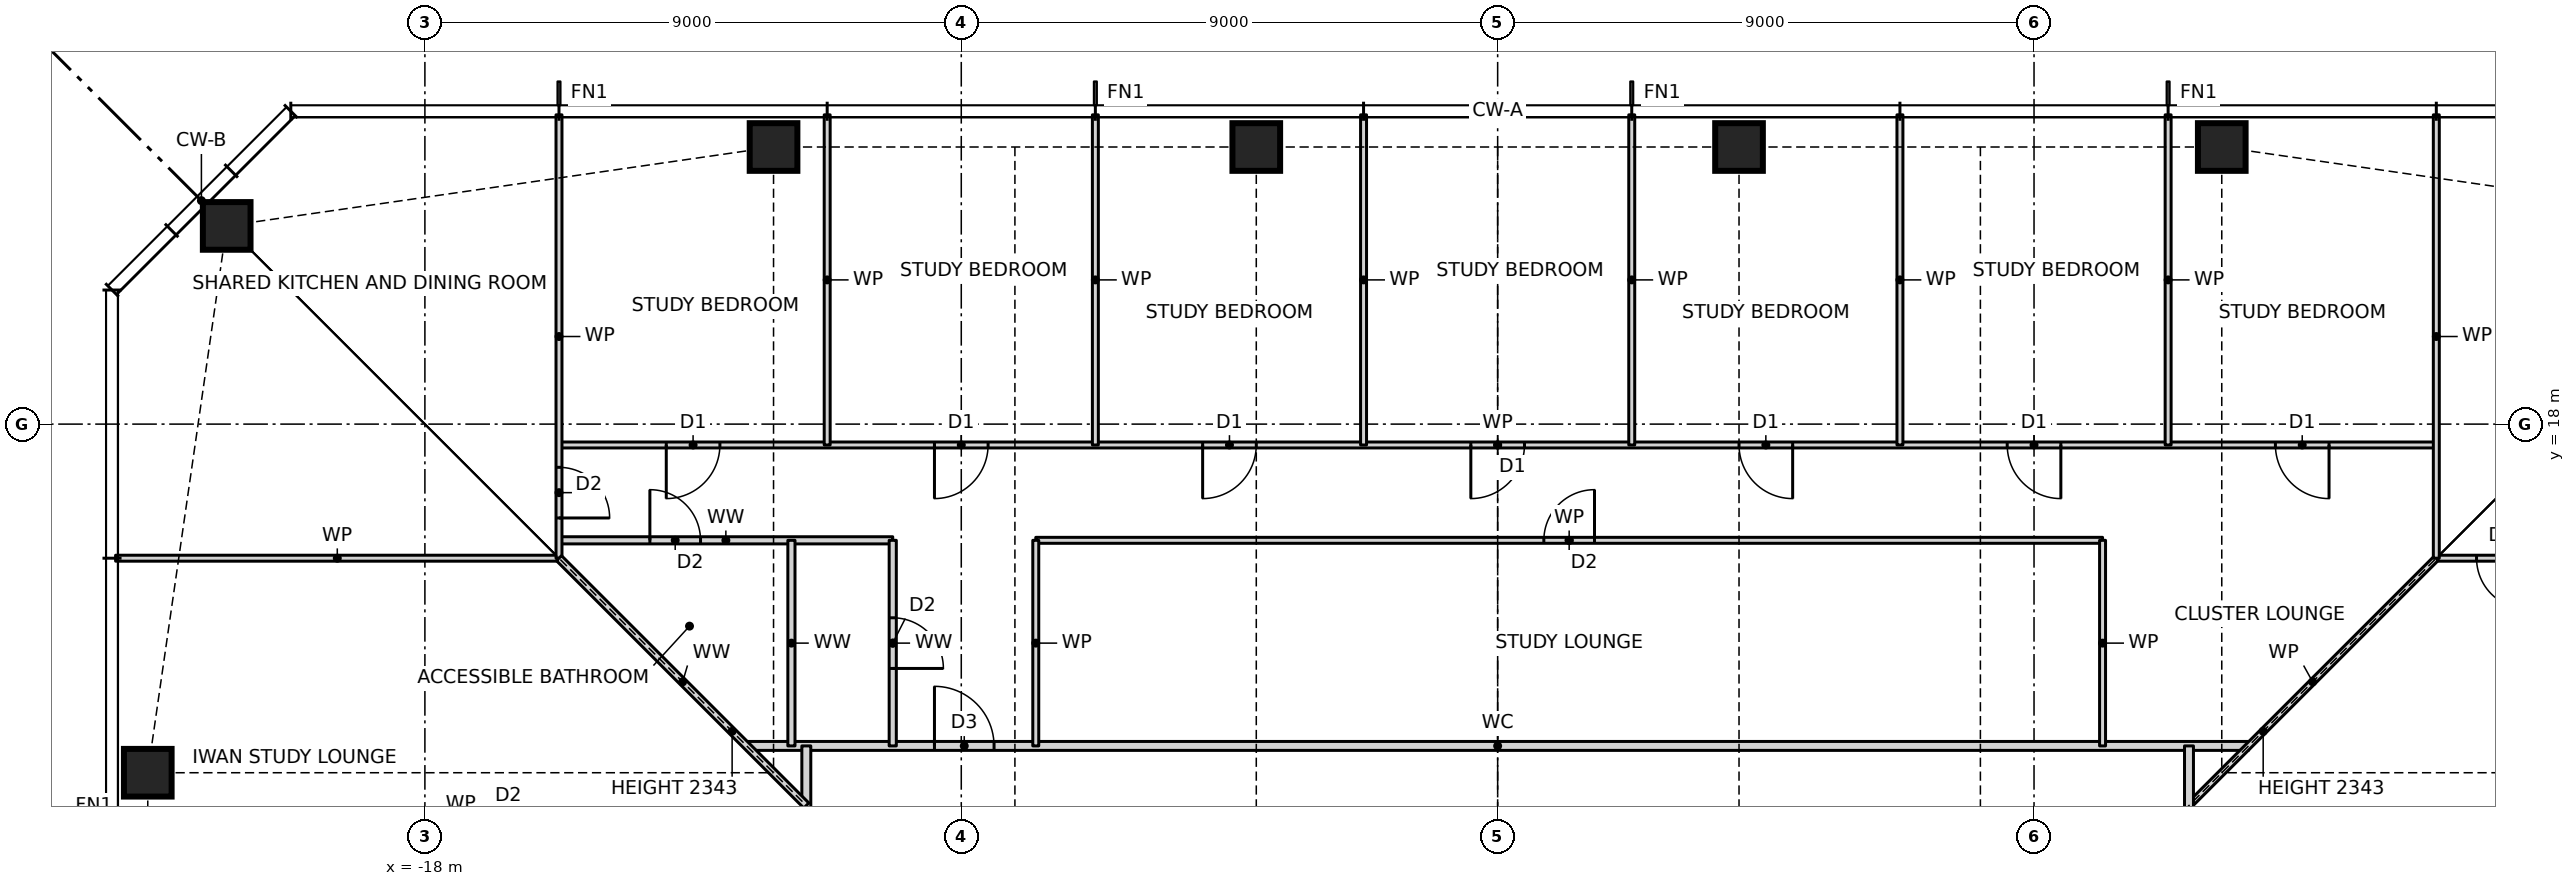
"""IFC4 building model, lengths in metres.
Left out: names, types, materials, properties, quantities, classifications, styles, units other than length and angle.
Written with IfcOpenShell. Run it as: python <this file> out.ifc"""

import sys

from ifc_helpers import new_model, si_unit, direction, frame, frame_2d, origin, origin_2d, place, context, subcontext, project, spatial, rectangle, hollow_rectangle, extrude, element, fill, save


model = new_model("IFC4")
c1 = context("Model", 3, precision=1e-05, world=origin(), true_north=direction((0.0, 1.0)))
c2 = subcontext(c1, "Body", "Model", "MODEL_VIEW")
j1 = project(units=[si_unit("LENGTHUNIT", "METRE"), si_unit("PLANEANGLEUNIT", "RADIAN")], contexts=[c1])
p1 = place(None, origin())
s1 = spatial("IfcSite", under=j1, at=p1, CompositionType="ELEMENT")
p2 = place(p1, origin())
s2 = spatial("IfcBuilding", under=s1, at=p2, CompositionType="ELEMENT")
p3 = place(p2, frame((0.0, 0.0, 36.0)))
s3 = spatial("IfcBuildingStorey", under=s2, at=p3, CompositionType="ELEMENT", Elevation=36.0)
for number, where, z_axis, x_axis in (
    (1, (12.15, 22.65, 0.0), (0.0, 0.0, 1.0), (1.0, 0.0, 0.0)),
    (2, (4.05, 22.65, 0.0), (0.0, 0.0, 1.0), (1.0, 0.0, 0.0)),
    (3, (-4.05, 22.65, 0.0), (0.0, 0.0, 1.0), (1.0, 0.0, 0.0)),
    (4, (-12.15, 22.65, 0.0), (0.0, 0.0, 1.0), (1.0, 0.0, 0.0)),
    (5, (-21.326, 21.326, 0.0), (0.0, 0.0, 1.0), (1.0, 0.0, 0.0)),
    (6, (-22.65, 12.15, 0.0), (0.0, 0.0, 1.0), (1.0, 0.0, 0.0)),
):
    element("IfcColumn", number, at=place(p3, frame(where, z_axis=z_axis, x_axis=x_axis)), inside=s3, PredefinedType="COLUMN", context=c2, shape_type="SweptSolid", body=[
        extrude(hollow_rectangle(XDim=0.8, YDim=0.8, WallThickness=0.09, at=origin_2d()), origin(), (0.0, 0.0, 1.0), 3.5),
    ])
p4 = place(p3, frame((-12.6, 12.6, 0.0), z_axis=(0.0, 0.0, 1.0), x_axis=(1.0, 0.0, 0.0)))
e7 = element("IfcWall", 7, at=p4, inside=s3, PredefinedType="PARTITIONING", context=c2, shape_type="SweptSolid", body=[
    extrude(rectangle(XDim=25.2, YDim=0.15, at=frame_2d((12.6, 0.0))), origin(), (0.0, 0.0, 1.0), 3.27),
])
p5 = place(p4, frame((3.15, 0.0, 0.0)))
e8 = element("IfcOpeningElement", 8, at=p5, cuts=e7, PredefinedType="OPENING", context=c2, shape_type="SweptSolid", body=[
    extrude(rectangle(XDim=1.0, YDim=2.1, at=frame_2d((0.5, 1.05))), frame((0.0, 0.085, 0.0), z_axis=(0.0, -1.0, 0.0), x_axis=(1.0, 0.0, 0.0)), (0.0, 0.0, 1.0), 0.17),
])
p6 = place(p3, frame((-23.19, 15.75, 0.0), z_axis=(0.0, 0.0, 1.0), x_axis=(1.0, 0.0, 0.0)))
e9 = element("IfcWall", 9, at=p6, inside=s3, PredefinedType="PARTITIONING", context=c2, shape_type="SweptSolid", body=[
    extrude(rectangle(XDim=7.44, YDim=0.1, at=frame_2d((3.72, 0.0))), origin(), (0.0, 0.0, 1.0), 3.27),
])
p7 = place(p3, frame((15.75, 15.75, 0.0), z_axis=(0.0, 0.0, 1.0), x_axis=(1.0, 0.0, 0.0)))
e10 = element("IfcWall", 10, at=p7, inside=s3, PredefinedType="PARTITIONING", context=c2, shape_type="SweptSolid", body=[
    extrude(rectangle(XDim=7.44, YDim=0.1, at=frame_2d((3.72, 0.0))), origin(), (0.0, 0.0, 1.0), 3.27),
])
p8 = place(p7, frame((0.675, 0.0, 0.0)))
e11 = element("IfcOpeningElement", 11, at=p8, cuts=e10, PredefinedType="OPENING", context=c2, shape_type="SweptSolid", body=[
    extrude(rectangle(XDim=0.85, YDim=2.1, at=frame_2d((0.425, 1.05))), frame((0.0, 0.06, 0.0), z_axis=(0.0, -1.0, 0.0), x_axis=(1.0, 0.0, 0.0)), (0.0, 0.0, 1.0), 0.12),
])
p9 = place(p3, frame((-15.75, 16.05, 0.0), z_axis=(0.0, 0.0, 1.0), x_axis=(1.0, 0.0, 0.0)))
e12 = element("IfcWall", 12, at=p9, inside=s3, PredefinedType="PARTITIONING", context=c2, shape_type="SweptSolid", body=[
    extrude(rectangle(XDim=5.6, YDim=0.12, at=frame_2d((2.8, 0.0))), origin(), (0.0, 0.0, 1.0), 3.27),
])
p10 = place(p9, frame((1.525, 0.0, 0.0)))
e13 = element("IfcOpeningElement", 13, at=p10, cuts=e12, PredefinedType="OPENING", context=c2, shape_type="SweptSolid", body=[
    extrude(rectangle(XDim=0.85, YDim=2.1, at=frame_2d((0.425, 1.05))), frame((0.0, 0.07, 0.0), z_axis=(0.0, -1.0, 0.0), x_axis=(1.0, 0.0, 0.0)), (0.0, 0.0, 1.0), 0.14),
])
p11 = place(p3, frame((-7.75, 16.05, 0.0), z_axis=(0.0, 0.0, 1.0), x_axis=(1.0, 0.0, 0.0)))
e14 = element("IfcWall", 14, at=p11, inside=s3, PredefinedType="PARTITIONING", context=c2, shape_type="SweptSolid", body=[
    extrude(rectangle(XDim=17.9, YDim=0.1, at=frame_2d((8.95, 0.0))), origin(), (0.0, 0.0, 1.0), 3.27),
])
p12 = place(p11, frame((8.525, 0.0, 0.0)))
e15 = element("IfcOpeningElement", 15, at=p12, cuts=e14, PredefinedType="OPENING", context=c2, shape_type="SweptSolid", body=[
    extrude(rectangle(XDim=0.85, YDim=2.1, at=frame_2d((0.425, 1.05))), frame((0.0, 0.06, 0.0), z_axis=(0.0, -1.0, 0.0), x_axis=(1.0, 0.0, 0.0)), (0.0, 0.0, 1.0), 0.12),
])
p13 = place(p3, frame((-15.75, 17.65, 0.0), z_axis=(0.0, 0.0, 1.0), x_axis=(1.0, 0.0, 0.0)))
e16 = element("IfcWall", 16, at=p13, inside=s3, PredefinedType="PARTITIONING", context=c2, shape_type="SweptSolid", body=[
    extrude(rectangle(XDim=31.5, YDim=0.1, at=frame_2d((15.75, 0.0))), origin(), (0.0, 0.0, 1.0), 3.27),
])
p14 = place(p13, frame((28.8, 0.0, 0.0)))
e17 = element("IfcOpeningElement", 17, at=p14, cuts=e16, PredefinedType="OPENING", context=c2, shape_type="SweptSolid", body=[
    extrude(rectangle(XDim=0.9, YDim=2.1, at=frame_2d((0.45, 1.05))), frame((0.0, 0.06, 0.0), z_axis=(0.0, -1.0, 0.0), x_axis=(1.0, 0.0, 0.0)), (0.0, 0.0, 1.0), 0.12),
])
p15 = place(p13, frame((24.3, 0.0, 0.0)))
e18 = element("IfcOpeningElement", 18, at=p15, cuts=e16, PredefinedType="OPENING", context=c2, shape_type="SweptSolid", body=[
    extrude(rectangle(XDim=0.9, YDim=2.1, at=frame_2d((0.45, 1.05))), frame((0.0, 0.06, 0.0), z_axis=(0.0, -1.0, 0.0), x_axis=(1.0, 0.0, 0.0)), (0.0, 0.0, 1.0), 0.12),
])
p16 = place(p13, frame((19.8, 0.0, 0.0)))
e19 = element("IfcOpeningElement", 19, at=p16, cuts=e16, PredefinedType="OPENING", context=c2, shape_type="SweptSolid", body=[
    extrude(rectangle(XDim=0.9, YDim=2.1, at=frame_2d((0.45, 1.05))), frame((0.0, 0.06, 0.0), z_axis=(0.0, -1.0, 0.0), x_axis=(1.0, 0.0, 0.0)), (0.0, 0.0, 1.0), 0.12),
])
p17 = place(p13, frame((15.3, 0.0, 0.0)))
e20 = element("IfcOpeningElement", 20, at=p17, cuts=e16, PredefinedType="OPENING", context=c2, shape_type="SweptSolid", body=[
    extrude(rectangle(XDim=0.9, YDim=2.1, at=frame_2d((0.45, 1.05))), frame((0.0, 0.06, 0.0), z_axis=(0.0, -1.0, 0.0), x_axis=(1.0, 0.0, 0.0)), (0.0, 0.0, 1.0), 0.12),
])
p18 = place(p13, frame((10.8, 0.0, 0.0)))
e21 = element("IfcOpeningElement", 21, at=p18, cuts=e16, PredefinedType="OPENING", context=c2, shape_type="SweptSolid", body=[
    extrude(rectangle(XDim=0.9, YDim=2.1, at=frame_2d((0.45, 1.05))), frame((0.0, 0.06, 0.0), z_axis=(0.0, -1.0, 0.0), x_axis=(1.0, 0.0, 0.0)), (0.0, 0.0, 1.0), 0.12),
])
p19 = place(p13, frame((6.3, 0.0, 0.0)))
e22 = element("IfcOpeningElement", 22, at=p19, cuts=e16, PredefinedType="OPENING", context=c2, shape_type="SweptSolid", body=[
    extrude(rectangle(XDim=0.9, YDim=2.1, at=frame_2d((0.45, 1.05))), frame((0.0, 0.06, 0.0), z_axis=(0.0, -1.0, 0.0), x_axis=(1.0, 0.0, 0.0)), (0.0, 0.0, 1.0), 0.12),
])
p20 = place(p13, frame((1.8, 0.0, 0.0)))
e23 = element("IfcOpeningElement", 23, at=p20, cuts=e16, PredefinedType="OPENING", context=c2, shape_type="SweptSolid", body=[
    extrude(rectangle(XDim=0.9, YDim=2.1, at=frame_2d((0.45, 1.05))), frame((0.0, 0.06, 0.0), z_axis=(0.0, -1.0, 0.0), x_axis=(1.0, 0.0, 0.0)), (0.0, 0.0, 1.0), 0.12),
])
p21 = place(p3, frame((11.6, 11.6, 0.0), z_axis=(0.0, 0.0, 1.0), x_axis=(0.707106781187, 0.707106781187, 0.0)))
e24 = element("IfcWall", 24, at=p21, inside=s3, PredefinedType="PARTITIONING", context=c2, shape_type="SweptSolid", body=[
    extrude(rectangle(XDim=5.869, YDim=0.1, at=frame_2d((2.935, 0.0))), origin(), (0.0, 0.0, 1.0), 2.343),
])
p22 = place(p3, frame((15.75, 15.75, 0.0), z_axis=(0.0, 0.0, 1.0), x_axis=(0.0, 1.0, 0.0)))
e25 = element("IfcWall", 25, at=p22, inside=s3, PredefinedType="PARTITIONING", context=c2, shape_type="SweptSolid", body=[
    extrude(rectangle(XDim=7.44, YDim=0.1, at=frame_2d((3.72, 0.0))), origin(), (0.0, 0.0, 1.0), 3.27),
])
p23 = place(p3, frame((11.6, -11.6, 0.0), z_axis=(0.0, 0.0, 1.0), x_axis=(0.0, 1.0, 0.0)))
e26 = element("IfcWall", 26, at=p23, inside=s3, PredefinedType="PARTITIONING", context=c2, shape_type="SweptSolid", body=[
    extrude(rectangle(XDim=24.2, YDim=0.15, at=frame_2d((12.1, 0.0))), origin(), (0.0, 0.0, 1.0), 3.27),
])
p24 = place(p23, frame((3.6, 0.0, 0.0)))
e27 = element("IfcOpeningElement", 27, at=p24, cuts=e26, PredefinedType="OPENING", context=c2, shape_type="SweptSolid", body=[
    extrude(rectangle(XDim=1.0, YDim=2.1, at=frame_2d((0.5, 1.05))), frame((0.0, 0.085, 0.0), z_axis=(0.0, -1.0, 0.0), x_axis=(1.0, 0.0, 0.0)), (0.0, 0.0, 1.0), 0.17),
])
p25 = place(p23, frame((21.025, 0.0, 0.0)))
e28 = element("IfcOpeningElement", 28, at=p25, cuts=e26, PredefinedType="OPENING", context=c2, shape_type="SweptSolid", body=[
    extrude(rectangle(XDim=1.0, YDim=2.1, at=frame_2d((0.5, 1.05))), frame((0.0, 0.085, 0.0), z_axis=(0.0, -1.0, 0.0), x_axis=(1.0, 0.0, 0.0)), (0.0, 0.0, 1.0), 0.17),
])
p26 = place(p3, frame((11.25, 17.65, 0.0), z_axis=(0.0, 0.0, 1.0), x_axis=(0.0, 1.0, 0.0)))
e29 = element("IfcWall", 29, at=p26, inside=s3, PredefinedType="PARTITIONING", context=c2, shape_type="SweptSolid", body=[
    extrude(rectangle(XDim=5.54, YDim=0.1, at=frame_2d((2.77, 0.0))), origin(), (0.0, 0.0, 1.0), 3.27),
])
p27 = place(p3, frame((10.15, 12.6, 0.0), z_axis=(0.0, 0.0, 1.0), x_axis=(0.0, 1.0, 0.0)))
e30 = element("IfcWall", 30, at=p27, inside=s3, PredefinedType="PARTITIONING", context=c2, shape_type="SweptSolid", body=[
    extrude(rectangle(XDim=3.45, YDim=0.1, at=frame_2d((1.725, 0.0))), origin(), (0.0, 0.0, 1.0), 3.27),
])
for number, where, z_axis, x_axis in (
    (31, (6.75, 17.65, 0.0), (0.0, 0.0, 1.0), (0.0, 1.0, 0.0)),
    (32, (2.25, 17.65, 0.0), (0.0, 0.0, 1.0), (0.0, 1.0, 0.0)),
    (33, (-2.25, 17.65, 0.0), (0.0, 0.0, 1.0), (0.0, 1.0, 0.0)),
    (34, (-6.75, 17.65, 0.0), (0.0, 0.0, 1.0), (0.0, 1.0, 0.0)),
):
    element("IfcWall", number, at=place(p3, frame(where, z_axis=z_axis, x_axis=x_axis)), inside=s3, PredefinedType="PARTITIONING", context=c2, shape_type="SweptSolid", body=[
        extrude(rectangle(XDim=5.54, YDim=0.1, at=frame_2d((2.77, 0.0))), origin(), (0.0, 0.0, 1.0), 3.27),
    ])
p28 = place(p3, frame((-7.75, 12.6, 0.0), z_axis=(0.0, 0.0, 1.0), x_axis=(0.0, 1.0, 0.0)))
e35 = element("IfcWall", 35, at=p28, inside=s3, PredefinedType="PARTITIONING", context=c2, shape_type="SweptSolid", body=[
    extrude(rectangle(XDim=3.45, YDim=0.1, at=frame_2d((1.725, 0.0))), origin(), (0.0, 0.0, 1.0), 3.27),
])
p29 = place(p3, frame((-10.15, 12.6, 0.0), z_axis=(0.0, 0.0, 1.0), x_axis=(0.0, 1.0, 0.0)))
e36 = element("IfcWall", 36, at=p29, inside=s3, PredefinedType="PARTITIONING", context=c2, shape_type="SweptSolid", body=[
    extrude(rectangle(XDim=3.45, YDim=0.12, at=frame_2d((1.725, 0.0))), origin(), (0.0, 0.0, 1.0), 3.27),
])
p30 = place(p29, frame((1.3, 0.0, 0.0)))
e37 = element("IfcOpeningElement", 37, at=p30, cuts=e36, PredefinedType="OPENING", context=c2, shape_type="SweptSolid", body=[
    extrude(rectangle(XDim=0.85, YDim=2.1, at=frame_2d((0.425, 1.05))), frame((0.0, 0.07, 0.0), z_axis=(0.0, -1.0, 0.0), x_axis=(1.0, 0.0, 0.0)), (0.0, 0.0, 1.0), 0.14),
])
p31 = place(p3, frame((-11.25, 17.65, 0.0), z_axis=(0.0, 0.0, 1.0), x_axis=(0.0, 1.0, 0.0)))
e38 = element("IfcWall", 38, at=p31, inside=s3, PredefinedType="PARTITIONING", context=c2, shape_type="SweptSolid", body=[
    extrude(rectangle(XDim=5.54, YDim=0.1, at=frame_2d((2.77, 0.0))), origin(), (0.0, 0.0, 1.0), 3.27),
])
p32 = place(p3, frame((-11.6, -11.6, 0.0), z_axis=(0.0, 0.0, 1.0), x_axis=(0.0, 1.0, 0.0)))
e39 = element("IfcWall", 39, at=p32, inside=s3, PredefinedType="PARTITIONING", context=c2, shape_type="SweptSolid", body=[
    extrude(rectangle(XDim=24.2, YDim=0.15, at=frame_2d((12.1, 0.0))), origin(), (0.0, 0.0, 1.0), 3.27),
])
p33 = place(p32, frame((12.14, 0.0, 0.0)))
e40 = element("IfcOpeningElement", 40, at=p33, cuts=e39, PredefinedType="OPENING", context=c2, shape_type="SweptSolid", body=[
    extrude(rectangle(XDim=1.0, YDim=2.1, at=frame_2d((0.5, 1.05))), frame((0.0, 0.085, 0.0), z_axis=(0.0, -1.0, 0.0), x_axis=(1.0, 0.0, 0.0)), (0.0, 0.0, 1.0), 0.17),
])
p34 = place(p3, frame((-11.85, 12.6, 0.0), z_axis=(0.0, 0.0, 1.0), x_axis=(0.0, 1.0, 0.0)))
e41 = element("IfcWall", 41, at=p34, inside=s3, PredefinedType="PARTITIONING", context=c2, shape_type="SweptSolid", body=[
    extrude(rectangle(XDim=3.45, YDim=0.12, at=frame_2d((1.725, 0.0))), origin(), (0.0, 0.0, 1.0), 3.27),
])
p35 = place(p3, frame((-15.75, 15.75, 0.0), z_axis=(0.0, 0.0, 1.0), x_axis=(0.0, 1.0, 0.0)))
e42 = element("IfcWall", 42, at=p35, inside=s3, PredefinedType="PARTITIONING", context=c2, shape_type="SweptSolid", body=[
    extrude(rectangle(XDim=7.44, YDim=0.1, at=frame_2d((3.72, 0.0))), origin(), (0.0, 0.0, 1.0), 3.27),
])
p36 = place(p35, frame((0.675, 0.0, 0.0)))
e43 = element("IfcOpeningElement", 43, at=p36, cuts=e42, PredefinedType="OPENING", context=c2, shape_type="SweptSolid", body=[
    extrude(rectangle(XDim=0.85, YDim=2.1, at=frame_2d((0.425, 1.05))), frame((0.0, 0.06, 0.0), z_axis=(0.0, -1.0, 0.0), x_axis=(1.0, 0.0, 0.0)), (0.0, 0.0, 1.0), 0.12),
])
p37 = place(p3, frame((-11.6, 11.6, 0.0), z_axis=(0.0, 0.0, 1.0), x_axis=(-0.707106781187, 0.707106781187, 0.0)))
e44 = element("IfcWall", 44, at=p37, inside=s3, PredefinedType="PARTITIONING", context=c2, shape_type="SweptSolid", body=[
    extrude(rectangle(XDim=5.869, YDim=0.12, at=frame_2d((2.935, 0.0))), origin(), (0.0, 0.0, 1.0), 2.343),
])
p38 = place(p14, frame((0.9, 0.0, 0.0), z_axis=(0.0, 0.0, 1.0), x_axis=(-1.0, 0.0, 0.0)))
e45 = element("IfcDoor", 45, at=p38, inside=s3, OperationType="SINGLE_SWING_LEFT", PredefinedType="DOOR", context=c2, shape_type="SweptSolid", body=[
    extrude(rectangle(XDim=0.9, YDim=2.1, at=frame_2d((0.45, 1.05))), frame((0.0, 0.025, 0.0), z_axis=(0.0, -1.0, 0.0), x_axis=(1.0, 0.0, 0.0)), (0.0, 0.0, 1.0), 0.05),
])
fill(e17, e45)
p39 = place(p15, frame((0.9, 0.0, 0.0), z_axis=(0.0, 0.0, 1.0), x_axis=(-1.0, 0.0, 0.0)))
e46 = element("IfcDoor", 46, at=p39, inside=s3, OperationType="SINGLE_SWING_LEFT", PredefinedType="DOOR", context=c2, shape_type="SweptSolid", body=[
    extrude(rectangle(XDim=0.9, YDim=2.1, at=frame_2d((0.45, 1.05))), frame((0.0, 0.025, 0.0), z_axis=(0.0, -1.0, 0.0), x_axis=(1.0, 0.0, 0.0)), (0.0, 0.0, 1.0), 0.05),
])
fill(e18, e46)
p40 = place(p16, frame((0.9, 0.0, 0.0), z_axis=(0.0, 0.0, 1.0), x_axis=(-1.0, 0.0, 0.0)))
e47 = element("IfcDoor", 47, at=p40, inside=s3, OperationType="SINGLE_SWING_LEFT", PredefinedType="DOOR", context=c2, shape_type="SweptSolid", body=[
    extrude(rectangle(XDim=0.9, YDim=2.1, at=frame_2d((0.45, 1.05))), frame((0.0, 0.025, 0.0), z_axis=(0.0, -1.0, 0.0), x_axis=(1.0, 0.0, 0.0)), (0.0, 0.0, 1.0), 0.05),
])
fill(e19, e47)
p41 = place(p17, frame((0.9, 0.0, 0.0), z_axis=(0.0, 0.0, 1.0), x_axis=(-1.0, 0.0, 0.0)))
e48 = element("IfcDoor", 48, at=p41, inside=s3, OperationType="SINGLE_SWING_RIGHT", PredefinedType="DOOR", context=c2, shape_type="SweptSolid", body=[
    extrude(rectangle(XDim=0.9, YDim=2.1, at=frame_2d((0.45, 1.05))), frame((0.0, 0.025, 0.0), z_axis=(0.0, -1.0, 0.0), x_axis=(1.0, 0.0, 0.0)), (0.0, 0.0, 1.0), 0.05),
])
fill(e20, e48)
p42 = place(p18, frame((0.9, 0.0, 0.0), z_axis=(0.0, 0.0, 1.0), x_axis=(-1.0, 0.0, 0.0)))
e49 = element("IfcDoor", 49, at=p42, inside=s3, OperationType="SINGLE_SWING_RIGHT", PredefinedType="DOOR", context=c2, shape_type="SweptSolid", body=[
    extrude(rectangle(XDim=0.9, YDim=2.1, at=frame_2d((0.45, 1.05))), frame((0.0, 0.025, 0.0), z_axis=(0.0, -1.0, 0.0), x_axis=(1.0, 0.0, 0.0)), (0.0, 0.0, 1.0), 0.05),
])
fill(e21, e49)
p43 = place(p19, frame((0.9, 0.0, 0.0), z_axis=(0.0, 0.0, 1.0), x_axis=(-1.0, 0.0, 0.0)))
e50 = element("IfcDoor", 50, at=p43, inside=s3, OperationType="SINGLE_SWING_RIGHT", PredefinedType="DOOR", context=c2, shape_type="SweptSolid", body=[
    extrude(rectangle(XDim=0.9, YDim=2.1, at=frame_2d((0.45, 1.05))), frame((0.0, 0.025, 0.0), z_axis=(0.0, -1.0, 0.0), x_axis=(1.0, 0.0, 0.0)), (0.0, 0.0, 1.0), 0.05),
])
fill(e22, e50)
p44 = place(p20, frame((0.9, 0.0, 0.0), z_axis=(0.0, 0.0, 1.0), x_axis=(-1.0, 0.0, 0.0)))
e51 = element("IfcDoor", 51, at=p44, inside=s3, OperationType="SINGLE_SWING_RIGHT", PredefinedType="DOOR", context=c2, shape_type="SweptSolid", body=[
    extrude(rectangle(XDim=0.9, YDim=2.1, at=frame_2d((0.45, 1.05))), frame((0.0, 0.025, 0.0), z_axis=(0.0, -1.0, 0.0), x_axis=(1.0, 0.0, 0.0)), (0.0, 0.0, 1.0), 0.05),
])
fill(e23, e51)
p45 = place(p5, origin())
e52 = element("IfcDoor", 52, at=p45, inside=s3, OperationType="SINGLE_SWING_LEFT", PredefinedType="DOOR", context=c2, shape_type="SweptSolid", body=[
    extrude(rectangle(XDim=1.0, YDim=2.1, at=frame_2d((0.5, 1.05))), frame((0.0, 0.025, 0.0), z_axis=(0.0, -1.0, 0.0), x_axis=(1.0, 0.0, 0.0)), (0.0, 0.0, 1.0), 0.05),
])
fill(e8, e52)
p46 = place(p12, origin())
e53 = element("IfcDoor", 53, at=p46, inside=s3, OperationType="SINGLE_SWING_RIGHT", PredefinedType="DOOR", context=c2, shape_type="SweptSolid", body=[
    extrude(rectangle(XDim=0.85, YDim=2.1, at=frame_2d((0.425, 1.05))), frame((0.0, 0.025, 0.0), z_axis=(0.0, -1.0, 0.0), x_axis=(1.0, 0.0, 0.0)), (0.0, 0.0, 1.0), 0.05),
])
fill(e15, e53)
p47 = place(p30, frame((0.85, 0.0, 0.0), z_axis=(0.0, 0.0, 1.0), x_axis=(-1.0, 0.0, 0.0)))
e54 = element("IfcDoor", 54, at=p47, inside=s3, OperationType="SINGLE_SWING_RIGHT", PredefinedType="DOOR", context=c2, shape_type="SweptSolid", body=[
    extrude(rectangle(XDim=0.85, YDim=2.1, at=frame_2d((0.425, 1.05))), frame((0.0, 0.025, 0.0), z_axis=(0.0, -1.0, 0.0), x_axis=(1.0, 0.0, 0.0)), (0.0, 0.0, 1.0), 0.05),
])
fill(e37, e54)
p48 = place(p10, origin())
e55 = element("IfcDoor", 55, at=p48, inside=s3, OperationType="SINGLE_SWING_LEFT", PredefinedType="DOOR", context=c2, shape_type="SweptSolid", body=[
    extrude(rectangle(XDim=0.85, YDim=2.1, at=frame_2d((0.425, 1.05))), frame((0.0, 0.025, 0.0), z_axis=(0.0, -1.0, 0.0), x_axis=(1.0, 0.0, 0.0)), (0.0, 0.0, 1.0), 0.05),
])
fill(e13, e55)
p49 = place(p8, frame((0.85, 0.0, 0.0), z_axis=(0.0, 0.0, 1.0), x_axis=(-1.0, 0.0, 0.0)))
e56 = element("IfcDoor", 56, at=p49, inside=s3, OperationType="SINGLE_SWING_LEFT", PredefinedType="DOOR", context=c2, shape_type="SweptSolid", body=[
    extrude(rectangle(XDim=0.85, YDim=2.1, at=frame_2d((0.425, 1.05))), frame((0.0, 0.025, 0.0), z_axis=(0.0, -1.0, 0.0), x_axis=(1.0, 0.0, 0.0)), (0.0, 0.0, 1.0), 0.05),
])
fill(e11, e56)
p50 = place(p36, frame((0.85, 0.0, 0.0), z_axis=(0.0, 0.0, 1.0), x_axis=(-1.0, 0.0, 0.0)))
e57 = element("IfcDoor", 57, at=p50, inside=s3, OperationType="SINGLE_SWING_RIGHT", PredefinedType="DOOR", context=c2, shape_type="SweptSolid", body=[
    extrude(rectangle(XDim=0.85, YDim=2.1, at=frame_2d((0.425, 1.05))), frame((0.0, 0.025, 0.0), z_axis=(0.0, -1.0, 0.0), x_axis=(1.0, 0.0, 0.0)), (0.0, 0.0, 1.0), 0.05),
])
fill(e43, e57)
save(model, sys.argv[1])
